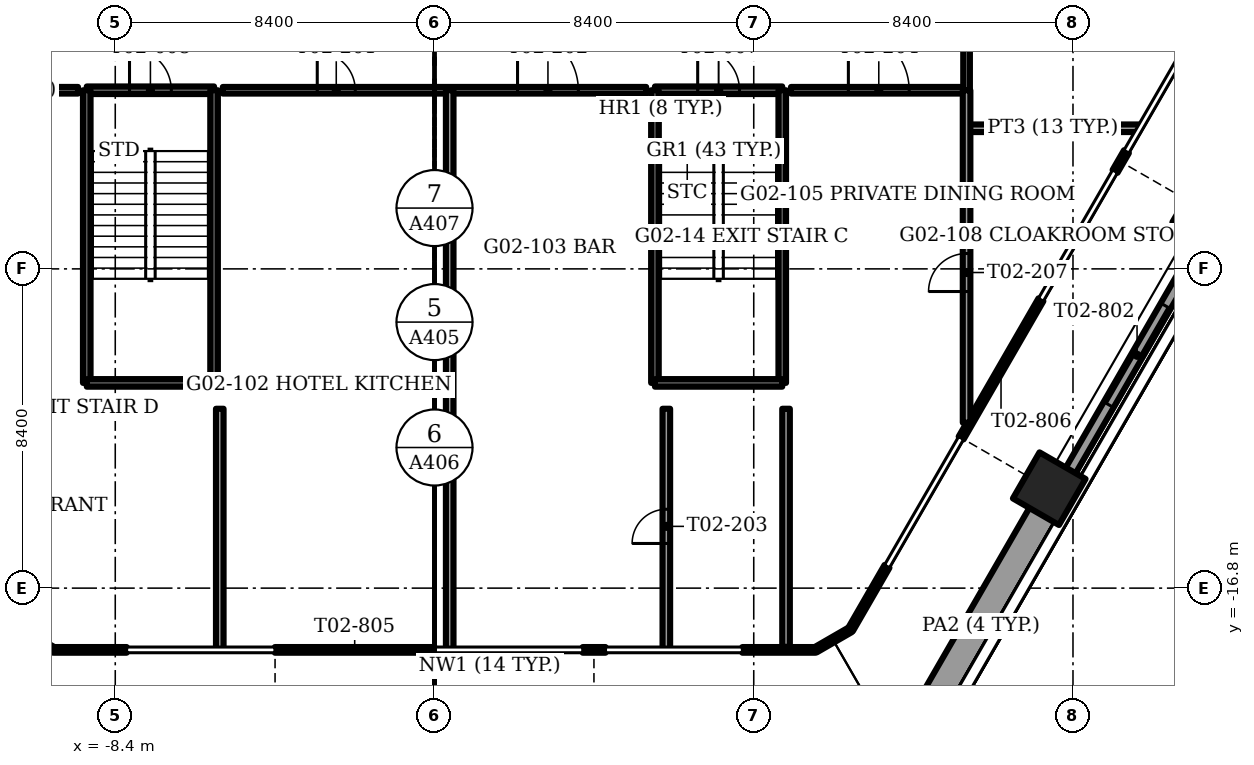
"""IFC4 building model, lengths in metres.
Left out: names, types, materials, properties, quantities, classifications, styles, units other than length and angle.
Written with IfcOpenShell. Run it as: python <this file> out.ifc"""

import sys

from ifc_helpers import new_model, si_unit, direction, frame, frame_2d, origin, origin_2d, place, context, subcontext, project, spatial, rectangle, extrude, element, fill, save


model = new_model("IFC4")
c1 = context("Model", 3, precision=1e-05, world=origin(), true_north=direction((0.0, 1.0)))
c2 = subcontext(c1, "Body", "Model", "MODEL_VIEW")
j1 = project(units=[si_unit("LENGTHUNIT", "METRE"), si_unit("PLANEANGLEUNIT", "RADIAN")], contexts=[c1])
p1 = place(None, origin())
s1 = spatial("IfcSite", under=j1, at=p1, CompositionType="ELEMENT")
p2 = place(p1, origin())
s2 = spatial("IfcBuilding", under=s1, at=p2, CompositionType="ELEMENT")
p3 = place(p2, frame((0.0, 0.0, 10.0)))
s3 = spatial("IfcBuildingStorey", under=s2, at=p3, CompositionType="ELEMENT", Elevation=10.0)
for number, where, z_axis, x_axis in (
    (1, (16.175, -14.183, -1.2), (0.0, 0.0, 1.0), (-0.5, -0.866, 0.0)),
    (2, (20.371, -6.917, -1.2), (0.0, 0.0, 1.0), (-0.5, -0.866, 0.0)),
):
    element("IfcColumn", number, at=place(p3, frame(where, z_axis=z_axis, x_axis=x_axis)), inside=s3, PredefinedType="COLUMN", context=c2, shape_type="SweptSolid", body=[
        extrude(rectangle(XDim=1.4, YDim=1.4, at=origin_2d()), origin(), (0.0, 0.0, 1.0), 4.5),
    ])
p4 = place(p3, frame((12.705, -20.694, 0.0), z_axis=(0.0, 0.0, 1.0), x_axis=(0.500005133765, 0.866022439784, 0.0)))
e3 = element("IfcWall", 3, at=p4, inside=s3, PredefinedType="PARAPET", context=c2, shape_type="SweptSolid", body=[
    extrude(rectangle(XDim=6.704, YDim=0.9, at=frame_2d((3.352, 0.0))), origin(), (0.0, 0.0, 1.0), 1.1),
])
p5 = place(p3, frame((16.727, -13.728, 0.0), z_axis=(0.0, 0.0, 1.0), x_axis=(0.499997206141, 0.866027016814, 0.0)))
e4 = element("IfcWall", 4, at=p5, inside=s3, PredefinedType="SOLIDWALL", context=c2, shape_type="SweptSolid", body=[
    extrude(rectangle(XDim=7.051, YDim=0.3, at=frame_2d((3.525, 0.0))), origin(), (0.0, 0.0, 1.0), 3.3),
])
p6 = place(p5, frame((2.025, 0.0, 0.0)))
e5 = element("IfcOpeningElement", 5, at=p6, cuts=e4, PredefinedType="OPENING", context=c2, shape_type="SweptSolid", body=[
    extrude(rectangle(XDim=3.0, YDim=2.4, at=frame_2d((1.5, 1.2))), frame((0.0, 0.15, 0.0), z_axis=(0.0, -1.0, 0.0), x_axis=(1.0, 0.0, 0.0)), (0.0, 0.0, 1.0), 0.3),
])
p7 = place(p3, frame((-4.2, -18.425, 0.0), z_axis=(0.0, 0.0, 1.0), x_axis=(1.0, 0.0, 0.0)))
e6 = element("IfcWall", 6, at=p7, inside=s3, PredefinedType="SOLIDWALL", context=c2, shape_type="SweptSolid", body=[
    extrude(rectangle(XDim=4.2, YDim=0.15, at=frame_2d((2.1, 0.0))), origin(), (0.0, 0.0, 1.0), 4.2),
])
p8 = place(p7, frame((0.6, 0.0, 0.0)))
e7 = element("IfcOpeningElement", 7, at=p8, cuts=e6, PredefinedType="OPENING", context=c2, shape_type="SweptSolid", body=[
    extrude(rectangle(XDim=3.0, YDim=2.4, at=frame_2d((1.5, 1.2))), frame((0.0, 0.075, 0.0), z_axis=(0.0, -1.0, 0.0), x_axis=(1.0, 0.0, 0.0)), (0.0, 0.0, 1.0), 0.15),
])
for number, where, z_axis, x_axis in (
    (8, (-10.023, -18.425, 0.0), (0.0, 0.0, 1.0), (1.0, 0.0, 0.0)),
    (9, (8.1, -18.425, 0.0), (0.0, 0.0, 1.0), (1.0, 0.0, 0.0)),
):
    element("IfcWall", number, at=place(p3, frame(where, z_axis=z_axis, x_axis=x_axis)), inside=s3, PredefinedType="SOLIDWALL", context=c2, shape_type="SweptSolid", body=[
        extrude(rectangle(XDim=1.923, YDim=0.15, at=frame_2d((0.961, 0.0))), origin(), (0.0, 0.0, 1.0), 4.2),
    ])
p9 = place(p3, frame((3.9, -18.425, 0.0), z_axis=(0.0, 0.0, 1.0), x_axis=(1.0, 0.0, 0.0)))
e10 = element("IfcWall", 10, at=p9, inside=s3, PredefinedType="SOLIDWALL", context=c2, shape_type="SweptSolid", body=[
    extrude(rectangle(XDim=0.6, YDim=0.15, at=frame_2d((0.3, 0.0))), origin(), (0.0, 0.0, 1.0), 4.2),
])
p10 = place(p3, frame((13.856, -12.85, 0.0), z_axis=(0.0, 0.0, 1.0), x_axis=(0.500002543286, 0.866023935413, 0.0)))
e11 = element("IfcWall", 11, at=p10, inside=s3, PredefinedType="SOLIDWALL", context=c2, shape_type="SweptSolid", body=[
    extrude(rectangle(XDim=4.2, YDim=0.15, at=frame_2d((2.1, 0.0))), origin(), (0.0, 0.0, 1.0), 4.2),
])
p11 = place(p10, frame((0.6, 0.0, 0.0)))
e12 = element("IfcOpeningElement", 12, at=p11, cuts=e11, PredefinedType="OPENING", context=c2, shape_type="SweptSolid", body=[
    extrude(rectangle(XDim=3.0, YDim=2.4, at=frame_2d((1.5, 1.2))), frame((0.0, 0.075, 0.0), z_axis=(0.0, -1.0, 0.0), x_axis=(1.0, 0.0, 0.0)), (0.0, 0.0, 1.0), 0.15),
])
p12 = place(p3, frame((10.945, -17.893, 0.0), z_axis=(0.0, 0.0, 1.0), x_axis=(0.499989888488, 0.86603124159, 0.0)))
e13 = element("IfcWall", 13, at=p12, inside=s3, PredefinedType="SOLIDWALL", context=c2, shape_type="SweptSolid", body=[
    extrude(rectangle(XDim=1.923, YDim=0.15, at=frame_2d((0.961, 0.0))), origin(), (0.0, 0.0, 1.0), 4.2),
])
p13 = place(p3, frame((17.906, -5.835, 0.0), z_axis=(0.0, 0.0, 1.0), x_axis=(0.50012165622, 0.865955154139, 0.0)))
e14 = element("IfcWall", 14, at=p13, inside=s3, PredefinedType="SOLIDWALL", context=c2, shape_type="SweptSolid", body=[
    extrude(rectangle(XDim=0.6, YDim=0.15, at=frame_2d((0.3, 0.0))), origin(), (0.0, 0.0, 1.0), 4.2),
])
p14 = place(p3, frame((-10.945, -17.893, 0.0), z_axis=(0.0, 0.0, 1.0), x_axis=(0.866048165231, -0.499960573946, 0.0)))
e15 = element("IfcWall", 15, at=p14, inside=s3, PredefinedType="SOLIDWALL", context=c2, shape_type="SweptSolid", body=[
    extrude(rectangle(XDim=1.065, YDim=0.15, at=frame_2d((0.532, 0.0))), origin(), (0.0, 0.0, 1.0), 4.2),
])
p15 = place(p14, frame((0.258, 0.0, 0.15)))
e16 = element("IfcOpeningElement", 16, at=p15, cuts=e15, PredefinedType="OPENING", context=c2, shape_type="SweptSolid", body=[
    extrude(rectangle(XDim=0.55, YDim=3.6, at=frame_2d((0.275, 1.8))), frame((0.0, 0.075, 0.0), z_axis=(0.0, -1.0, 0.0), x_axis=(1.0, 0.0, 0.0)), (0.0, 0.0, 1.0), 0.15),
])
p16 = place(p3, frame((10.023, -18.425, 0.0), z_axis=(0.0, 0.0, 1.0), x_axis=(0.866048165231, 0.499960573946, 0.0)))
e17 = element("IfcWall", 17, at=p16, inside=s3, PredefinedType="SOLIDWALL", context=c2, shape_type="SweptSolid", body=[
    extrude(rectangle(XDim=1.065, YDim=0.15, at=frame_2d((0.532, 0.0))), origin(), (0.0, 0.0, 1.0), 4.2),
])
p17 = place(p16, frame((0.258, 0.0, 0.15)))
e18 = element("IfcOpeningElement", 18, at=p17, cuts=e17, PredefinedType="OPENING", context=c2, shape_type="SweptSolid", body=[
    extrude(rectangle(XDim=0.55, YDim=3.6, at=frame_2d((0.275, 1.8))), frame((0.0, 0.075, 0.0), z_axis=(0.0, -1.0, 0.0), x_axis=(1.0, 0.0, 0.0)), (0.0, 0.0, 1.0), 0.15),
])
p18 = place(p3, frame((5.8, -3.7, -0.3), z_axis=(0.0, 0.0, 1.0), x_axis=(1.0, 0.0, 0.0)))
e19 = element("IfcWall", 19, at=p18, inside=s3, PredefinedType="SOLIDWALL", context=c2, shape_type="SweptSolid", body=[
    extrude(rectangle(XDim=3.35, YDim=0.2, at=frame_2d((1.675, 0.0))), origin(), (0.0, 0.0, 1.0), 4.5),
])
p19 = place(p18, frame((1.125, 0.0, 0.0)))
e20 = element("IfcOpeningElement", 20, at=p19, cuts=e19, PredefinedType="OPENING", context=c2, shape_type="SweptSolid", body=[
    extrude(rectangle(XDim=1.1, YDim=2.1, at=frame_2d((0.55, 1.05))), frame((0.0, 0.1, 0.0), z_axis=(0.0, -1.0, 0.0), x_axis=(1.0, 0.0, 0.0)), (0.0, 0.0, 1.0), 0.2),
])
for number, where, z_axis, x_axis in (
    (21, (5.8, -3.7, -0.3), (0.0, 0.0, 1.0), (0.0, -1.0, 0.0)),
    (22, (9.15, -3.7, -0.3), (0.0, 0.0, 1.0), (0.0, -1.0, 0.0)),
):
    element("IfcWall", number, at=place(p3, frame(where, z_axis=z_axis, x_axis=x_axis)), inside=s3, PredefinedType="SOLIDWALL", context=c2, shape_type="SweptSolid", body=[
        extrude(rectangle(XDim=7.7, YDim=0.2, at=frame_2d((3.85, 0.0))), origin(), (0.0, 0.0, 1.0), 4.5),
    ])
p20 = place(p3, frame((5.8, -11.4, -0.3), z_axis=(0.0, 0.0, 1.0), x_axis=(1.0, 0.0, 0.0)))
e23 = element("IfcWall", 23, at=p20, inside=s3, PredefinedType="SOLIDWALL", context=c2, shape_type="SweptSolid", body=[
    extrude(rectangle(XDim=3.35, YDim=0.2, at=frame_2d((1.675, 0.0))), origin(), (0.0, 0.0, 1.0), 4.5),
])
p21 = place(p3, frame((-9.15, -3.7, -0.3), z_axis=(0.0, 0.0, 1.0), x_axis=(1.0, 0.0, 0.0)))
e24 = element("IfcWall", 24, at=p21, inside=s3, PredefinedType="SOLIDWALL", context=c2, shape_type="SweptSolid", body=[
    extrude(rectangle(XDim=3.35, YDim=0.2, at=frame_2d((1.675, 0.0))), origin(), (0.0, 0.0, 1.0), 4.5),
])
p22 = place(p21, frame((1.125, 0.0, 0.0)))
e25 = element("IfcOpeningElement", 25, at=p22, cuts=e24, PredefinedType="OPENING", context=c2, shape_type="SweptSolid", body=[
    extrude(rectangle(XDim=1.1, YDim=2.1, at=frame_2d((0.55, 1.05))), frame((0.0, 0.1, 0.0), z_axis=(0.0, -1.0, 0.0), x_axis=(1.0, 0.0, 0.0)), (0.0, 0.0, 1.0), 0.2),
])
for number, where, z_axis, x_axis in (
    (26, (-9.15, -3.7, -0.3), (0.0, 0.0, 1.0), (0.0, -1.0, 0.0)),
    (27, (-5.8, -3.7, -0.3), (0.0, 0.0, 1.0), (0.0, -1.0, 0.0)),
):
    element("IfcWall", number, at=place(p3, frame(where, z_axis=z_axis, x_axis=x_axis)), inside=s3, PredefinedType="SOLIDWALL", context=c2, shape_type="SweptSolid", body=[
        extrude(rectangle(XDim=7.7, YDim=0.2, at=frame_2d((3.85, 0.0))), origin(), (0.0, 0.0, 1.0), 4.5),
    ])
p23 = place(p3, frame((-9.15, -11.4, -0.3), z_axis=(0.0, 0.0, 1.0), x_axis=(1.0, 0.0, 0.0)))
e28 = element("IfcWall", 28, at=p23, inside=s3, PredefinedType="SOLIDWALL", context=c2, shape_type="SweptSolid", body=[
    extrude(rectangle(XDim=3.35, YDim=0.2, at=frame_2d((1.675, 0.0))), origin(), (0.0, 0.0, 1.0), 4.5),
])
p24 = place(p3, frame((-14.0, -3.7, 0.0), z_axis=(0.0, 0.0, 1.0), x_axis=(1.0, 0.0, 0.0)))
e29 = element("IfcWall", 29, at=p24, inside=s3, PredefinedType="PARTITIONING", context=c2, shape_type="SweptSolid", body=[
    extrude(rectangle(XDim=4.62, YDim=0.175, at=frame_2d((2.31, 0.0))), origin(), (0.0, 0.0, 1.0), 4.2),
])
p25 = place(p24, frame((1.51, 0.0, 0.0)))
e30 = element("IfcOpeningElement", 30, at=p25, cuts=e29, PredefinedType="OPENING", context=c2, shape_type="SweptSolid", body=[
    extrude(rectangle(XDim=1.6, YDim=2.1, at=frame_2d((0.8, 1.05))), frame((0.0, 0.087, 0.0), z_axis=(0.0, -1.0, 0.0), x_axis=(1.0, 0.0, 0.0)), (0.0, 0.0, 1.0), 0.175),
])
p26 = place(p3, frame((-5.57, -3.7, 0.0), z_axis=(0.0, 0.0, 1.0), x_axis=(1.0, 0.0, 0.0)))
e31 = element("IfcWall", 31, at=p26, inside=s3, PredefinedType="PARTITIONING", context=c2, shape_type="SweptSolid", body=[
    extrude(rectangle(XDim=11.14, YDim=0.175, at=frame_2d((5.57, 0.0))), origin(), (0.0, 0.0, 1.0), 4.2),
])
p27 = place(p26, frame((2.485, 0.0, 0.0)))
e32 = element("IfcOpeningElement", 32, at=p27, cuts=e31, PredefinedType="OPENING", context=c2, shape_type="SweptSolid", body=[
    extrude(rectangle(XDim=1.0, YDim=2.1, at=frame_2d((0.5, 1.05))), frame((0.0, 0.087, 0.0), z_axis=(0.0, -1.0, 0.0), x_axis=(1.0, 0.0, 0.0)), (0.0, 0.0, 1.0), 0.175),
])
p28 = place(p26, frame((7.755, 0.0, 0.0)))
e33 = element("IfcOpeningElement", 33, at=p28, cuts=e31, PredefinedType="OPENING", context=c2, shape_type="SweptSolid", body=[
    extrude(rectangle(XDim=1.6, YDim=2.1, at=frame_2d((0.8, 1.05))), frame((0.0, 0.087, 0.0), z_axis=(0.0, -1.0, 0.0), x_axis=(1.0, 0.0, 0.0)), (0.0, 0.0, 1.0), 0.175),
])
p29 = place(p3, frame((9.38, -3.7, 0.0), z_axis=(0.0, 0.0, 1.0), x_axis=(1.0, 0.0, 0.0)))
e34 = element("IfcWall", 34, at=p29, inside=s3, PredefinedType="PARTITIONING", context=c2, shape_type="SweptSolid", body=[
    extrude(rectangle(XDim=4.62, YDim=0.175, at=frame_2d((2.31, 0.0))), origin(), (0.0, 0.0, 1.0), 4.2),
])
p30 = place(p29, frame((1.51, 0.0, 0.0)))
e35 = element("IfcOpeningElement", 35, at=p30, cuts=e34, PredefinedType="OPENING", context=c2, shape_type="SweptSolid", body=[
    extrude(rectangle(XDim=1.6, YDim=2.1, at=frame_2d((0.8, 1.05))), frame((0.0, 0.087, 0.0), z_axis=(0.0, -1.0, 0.0), x_axis=(1.0, 0.0, 0.0)), (0.0, 0.0, 1.0), 0.175),
])
p31 = place(p3, frame((14.0, -3.7, 0.0), z_axis=(0.0, 0.0, 1.0), x_axis=(0.0, 1.0, 0.0)))
e36 = element("IfcWall", 36, at=p31, inside=s3, PredefinedType="PARTITIONING", context=c2, shape_type="SweptSolid", body=[
    extrude(rectangle(XDim=16.268, YDim=0.175, at=frame_2d((8.134, 0.0))), origin(), (0.0, 0.0, 1.0), 4.2),
])
p32 = place(p31, frame((4.5, 0.0, 0.0)))
e37 = element("IfcOpeningElement", 37, at=p32, cuts=e36, PredefinedType="OPENING", context=c2, shape_type="SweptSolid", body=[
    extrude(rectangle(XDim=1.6, YDim=2.1, at=frame_2d((0.8, 1.05))), frame((0.0, 0.087, 0.0), z_axis=(0.0, -1.0, 0.0), x_axis=(1.0, 0.0, 0.0)), (0.0, 0.0, 1.0), 0.175),
])
p33 = place(p31, frame((12.5, 0.0, 0.0)))
e38 = element("IfcOpeningElement", 38, at=p33, cuts=e36, PredefinedType="OPENING", context=c2, shape_type="SweptSolid", body=[
    extrude(rectangle(XDim=1.0, YDim=2.1, at=frame_2d((0.5, 1.05))), frame((0.0, 0.087, 0.0), z_axis=(0.0, -1.0, 0.0), x_axis=(1.0, 0.0, 0.0)), (0.0, 0.0, 1.0), 0.175),
])
p34 = place(p3, frame((14.0, -4.7, 0.0), z_axis=(0.0, 0.0, 1.0), x_axis=(1.0, 0.0, 0.0)))
e39 = element("IfcWall", 39, at=p34, inside=s3, PredefinedType="PARTITIONING", context=c2, shape_type="SweptSolid", body=[
    extrude(rectangle(XDim=4.541, YDim=0.2, at=frame_2d((2.27, 0.0))), origin(), (0.0, 0.0, 1.0), 4.2),
])
p35 = place(p3, frame((-5.65, -18.406, 0.0), z_axis=(0.0, 0.0, 1.0), x_axis=(0.0, 1.0, 0.0)))
e40 = element("IfcWall", 40, at=p35, inside=s3, PredefinedType="PARTITIONING", context=c2, shape_type="SweptSolid", body=[
    extrude(rectangle(XDim=6.326, YDim=0.2, at=frame_2d((3.163, 0.0))), origin(), (0.0, 0.0, 1.0), 4.2),
])
p36 = place(p3, frame((0.4, -18.406, 0.0), z_axis=(0.0, 0.0, 1.0), x_axis=(0.0, 1.0, 0.0)))
e41 = element("IfcWall", 41, at=p36, inside=s3, PredefinedType="PARTITIONING", context=c2, shape_type="SweptSolid", body=[
    extrude(rectangle(XDim=14.706, YDim=0.2, at=frame_2d((7.353, 0.0))), origin(), (0.0, 0.0, 1.0), 4.2),
])
p37 = place(p3, frame((6.1, -18.406, 0.0), z_axis=(0.0, 0.0, 1.0), x_axis=(0.0, 1.0, 0.0)))
e42 = element("IfcWall", 42, at=p37, inside=s3, PredefinedType="PARTITIONING", context=c2, shape_type="SweptSolid", body=[
    extrude(rectangle(XDim=6.326, YDim=0.2, at=frame_2d((3.163, 0.0))), origin(), (0.0, 0.0, 1.0), 4.2),
])
p38 = place(p37, frame((2.781, 0.0, 0.0)))
e43 = element("IfcOpeningElement", 43, at=p38, cuts=e42, PredefinedType="OPENING", context=c2, shape_type="SweptSolid", body=[
    extrude(rectangle(XDim=0.9, YDim=2.1, at=frame_2d((0.45, 1.05))), frame((0.0, 0.1, 0.0), z_axis=(0.0, -1.0, 0.0), x_axis=(1.0, 0.0, 0.0)), (0.0, 0.0, 1.0), 0.2),
])
p39 = place(p3, frame((9.25, -18.345, 0.0), z_axis=(0.0, 0.0, 1.0), x_axis=(0.0, 1.0, 0.0)))
e44 = element("IfcWall", 44, at=p39, inside=s3, PredefinedType="PARTITIONING", context=c2, shape_type="SweptSolid", body=[
    extrude(rectangle(XDim=6.265, YDim=0.2, at=frame_2d((3.132, 0.0))), origin(), (0.0, 0.0, 1.0), 4.2),
])
p40 = place(p3, frame((14.0, -12.446, 0.0), z_axis=(0.0, 0.0, 1.0), x_axis=(0.0, 1.0, 0.0)))
e45 = element("IfcWall", 45, at=p40, inside=s3, PredefinedType="PARTITIONING", context=c2, shape_type="SweptSolid", body=[
    extrude(rectangle(XDim=8.746, YDim=0.2, at=frame_2d((4.373, 0.0))), origin(), (0.0, 0.0, 1.0), 4.2),
])
p41 = place(p40, frame((3.451, 0.0, 0.0)))
e46 = element("IfcOpeningElement", 46, at=p41, cuts=e45, PredefinedType="OPENING", context=c2, shape_type="SweptSolid", body=[
    extrude(rectangle(XDim=1.0, YDim=2.1, at=frame_2d((0.5, 1.05))), frame((0.0, 0.1, 0.0), z_axis=(0.0, -1.0, 0.0), x_axis=(1.0, 0.0, 0.0)), (0.0, 0.0, 1.0), 0.2),
])
p42 = place(p6, origin())
e47 = element("IfcDoor", 47, at=p42, inside=s3, OperationType="SLIDING_TO_LEFT", PredefinedType="DOOR", context=c2, shape_type="SweptSolid", body=[
    extrude(rectangle(XDim=3.0, YDim=2.4, at=frame_2d((1.5, 1.2))), frame((0.0, 0.025, 0.0), z_axis=(0.0, -1.0, 0.0), x_axis=(1.0, 0.0, 0.0)), (0.0, 0.0, 1.0), 0.05),
])
fill(e5, e47)
p43 = place(p8, origin())
e48 = element("IfcDoor", 48, at=p43, inside=s3, OperationType="SLIDING_TO_RIGHT", PredefinedType="DOOR", context=c2, shape_type="SweptSolid", body=[
    extrude(rectangle(XDim=3.0, YDim=2.4, at=frame_2d((1.5, 1.2))), frame((0.0, 0.025, 0.0), z_axis=(0.0, -1.0, 0.0), x_axis=(1.0, 0.0, 0.0)), (0.0, 0.0, 1.0), 0.05),
])
fill(e7, e48)
p44 = place(p11, origin())
e49 = element("IfcDoor", 49, at=p44, inside=s3, OperationType="SLIDING_TO_RIGHT", PredefinedType="DOOR", context=c2, shape_type="SweptSolid", body=[
    extrude(rectangle(XDim=3.0, YDim=2.4, at=frame_2d((1.5, 1.2))), frame((0.0, 0.025, 0.0), z_axis=(0.0, -1.0, 0.0), x_axis=(1.0, 0.0, 0.0)), (0.0, 0.0, 1.0), 0.05),
])
fill(e12, e49)
p45 = place(p17, origin())
e50 = element("IfcWindow", 50, at=p45, inside=s3, PartitioningType="SINGLE_PANEL", PredefinedType="WINDOW", context=c2, shape_type="SweptSolid", body=[
    extrude(rectangle(XDim=0.55, YDim=3.6, at=frame_2d((0.275, 1.8))), frame((0.0, 0.03, 0.0), z_axis=(0.0, -1.0, 0.0), x_axis=(1.0, 0.0, 0.0)), (0.0, 0.0, 1.0), 0.06),
])
fill(e18, e50)
p46 = place(p19, origin())
e51 = element("IfcDoor", 51, at=p46, inside=s3, OperationType="SINGLE_SWING_LEFT", PredefinedType="DOOR", context=c2, shape_type="SweptSolid", body=[
    extrude(rectangle(XDim=1.1, YDim=2.1, at=frame_2d((0.55, 1.05))), frame((0.0, 0.025, 0.0), z_axis=(0.0, -1.0, 0.0), x_axis=(1.0, 0.0, 0.0)), (0.0, 0.0, 1.0), 0.05),
])
fill(e20, e51)
p47 = place(p22, origin())
e52 = element("IfcDoor", 52, at=p47, inside=s3, OperationType="SINGLE_SWING_LEFT", PredefinedType="DOOR", context=c2, shape_type="SweptSolid", body=[
    extrude(rectangle(XDim=1.1, YDim=2.1, at=frame_2d((0.55, 1.05))), frame((0.0, 0.025, 0.0), z_axis=(0.0, -1.0, 0.0), x_axis=(1.0, 0.0, 0.0)), (0.0, 0.0, 1.0), 0.05),
])
fill(e25, e52)
p48 = place(p27, origin())
e53 = element("IfcDoor", 53, at=p48, inside=s3, OperationType="SINGLE_SWING_LEFT", PredefinedType="DOOR", context=c2, shape_type="SweptSolid", body=[
    extrude(rectangle(XDim=1.0, YDim=2.1, at=frame_2d((0.5, 1.05))), frame((0.0, 0.025, 0.0), z_axis=(0.0, -1.0, 0.0), x_axis=(1.0, 0.0, 0.0)), (0.0, 0.0, 1.0), 0.05),
])
fill(e32, e53)
p49 = place(p28, origin())
e54 = element("IfcDoor", 54, at=p49, inside=s3, OperationType="DOUBLE_DOOR_SINGLE_SWING", PredefinedType="DOOR", context=c2, shape_type="SweptSolid", body=[
    extrude(rectangle(XDim=1.6, YDim=2.1, at=frame_2d((0.8, 1.05))), frame((0.0, 0.025, 0.0), z_axis=(0.0, -1.0, 0.0), x_axis=(1.0, 0.0, 0.0)), (0.0, 0.0, 1.0), 0.05),
])
fill(e33, e54)
p50 = place(p38, origin())
e55 = element("IfcDoor", 55, at=p50, inside=s3, OperationType="SINGLE_SWING_LEFT", PredefinedType="DOOR", context=c2, shape_type="SweptSolid", body=[
    extrude(rectangle(XDim=0.9, YDim=2.1, at=frame_2d((0.45, 1.05))), frame((0.0, 0.025, 0.0), z_axis=(0.0, -1.0, 0.0), x_axis=(1.0, 0.0, 0.0)), (0.0, 0.0, 1.0), 0.05),
])
fill(e43, e55)
p51 = place(p30, origin())
e56 = element("IfcDoor", 56, at=p51, inside=s3, OperationType="DOUBLE_DOOR_SINGLE_SWING", PredefinedType="DOOR", context=c2, shape_type="SweptSolid", body=[
    extrude(rectangle(XDim=1.6, YDim=2.1, at=frame_2d((0.8, 1.05))), frame((0.0, 0.025, 0.0), z_axis=(0.0, -1.0, 0.0), x_axis=(1.0, 0.0, 0.0)), (0.0, 0.0, 1.0), 0.05),
])
fill(e35, e56)
p52 = place(p41, origin())
e57 = element("IfcDoor", 57, at=p52, inside=s3, OperationType="SINGLE_SWING_LEFT", PredefinedType="DOOR", context=c2, shape_type="SweptSolid", body=[
    extrude(rectangle(XDim=1.0, YDim=2.1, at=frame_2d((0.5, 1.05))), frame((0.0, 0.025, 0.0), z_axis=(0.0, -1.0, 0.0), x_axis=(1.0, 0.0, 0.0)), (0.0, 0.0, 1.0), 0.05),
])
fill(e46, e57)
save(model, sys.argv[1])
